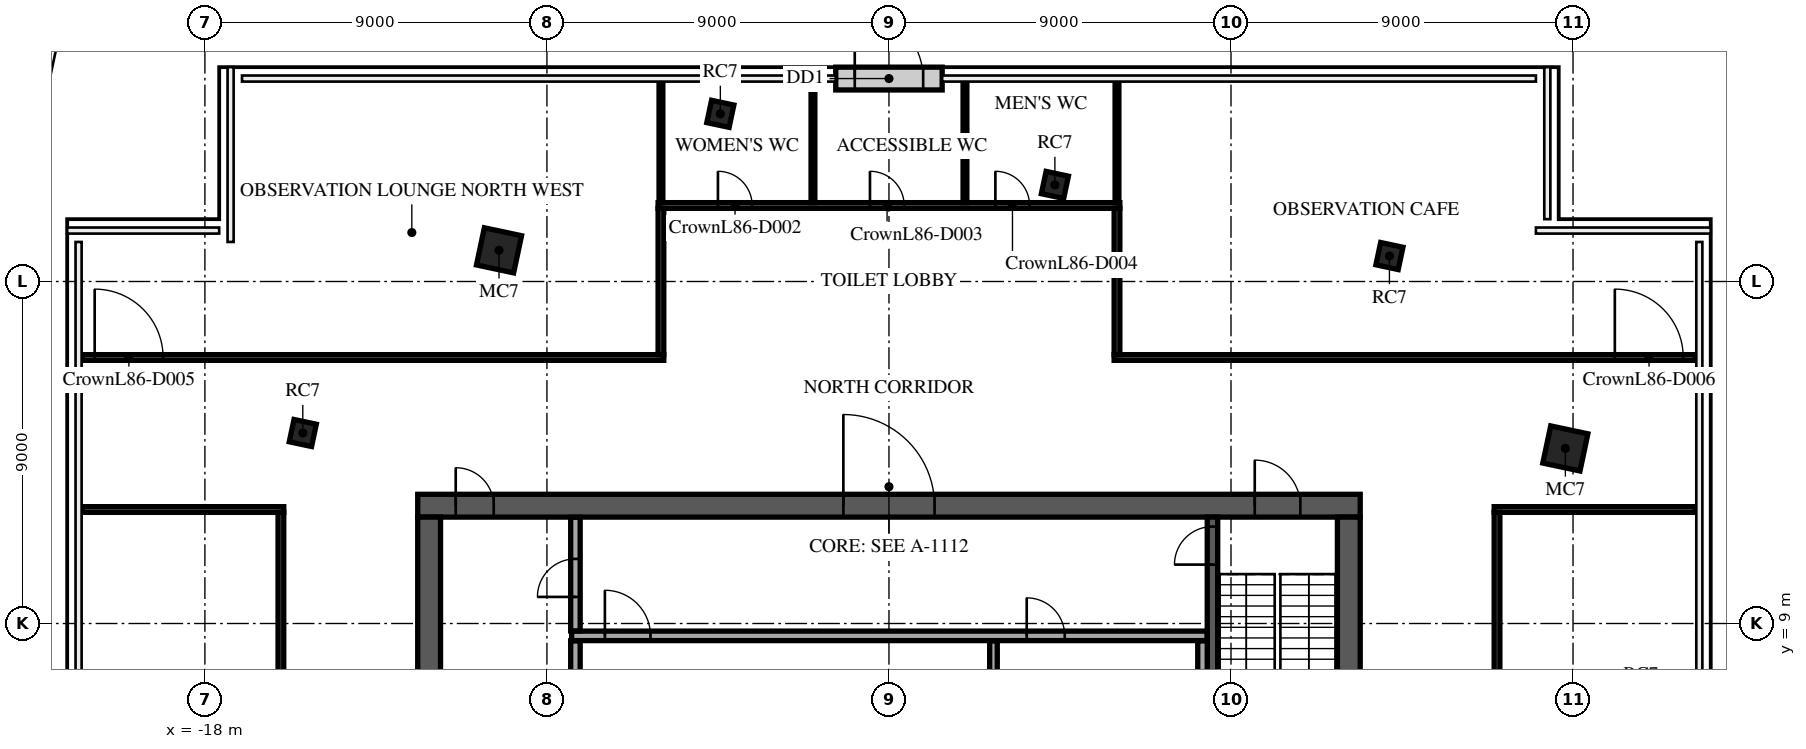
"""IFC4 building model, lengths in metres.
Left out: names, types, materials, properties, quantities, classifications, styles, units other than length and angle.
Written with IfcOpenShell. Run it as: python <this file> out.ifc"""

import sys

from ifc_helpers import new_model, si_unit, direction, frame, frame_2d, origin, origin_2d, place, context, subcontext, project, spatial, rectangle, extrude, element, fill, save


model = new_model("IFC4")
c1 = context("Model", 3, precision=1e-05, world=origin(), true_north=direction((0.0, 1.0)))
c2 = subcontext(c1, "Body", "Model", "MODEL_VIEW")
j1 = project(units=[si_unit("LENGTHUNIT", "METRE"), si_unit("PLANEANGLEUNIT", "RADIAN")], contexts=[c1])
p1 = place(None, origin())
s1 = spatial("IfcSite", under=j1, at=p1, CompositionType="ELEMENT")
p2 = place(p1, origin())
s2 = spatial("IfcBuilding", under=s1, at=p2, CompositionType="ELEMENT")
p3 = place(p2, frame((0.0, 0.0, 368.1)))
s3 = spatial("IfcBuildingStorey", under=s2, at=p3, CompositionType="ELEMENT", Elevation=368.1)
p4 = place(p3, frame((-10.261, 18.82, 0.0), z_axis=(0.0, 0.0, 1.0), x_axis=(0.207911690818, 0.978147600734, 0.0)))
e1 = element("IfcColumn", 1, at=p4, inside=s3, PredefinedType="COLUMN", context=c2, shape_type="SweptSolid", body=[
    extrude(rectangle(XDim=1.0, YDim=1.0, at=origin_2d()), origin(), (0.0, 0.0, 1.0), 5.0),
])
p5 = place(p3, frame((-15.424, 14.013, 0.0), z_axis=(0.0, 0.0, 1.0), x_axis=(0.207911690818, 0.978147600734, 0.0)))
e2 = element("IfcColumn", 2, at=p5, inside=s3, PredefinedType="COLUMN", context=c2, shape_type="SweptSolid", body=[
    extrude(rectangle(XDim=0.6, YDim=0.6, at=origin_2d()), origin(), (0.0, 0.0, 1.0), 5.0),
])
p6 = place(p3, frame((17.798, 13.607, 0.0), z_axis=(0.0, 0.0, 1.0), x_axis=(0.207911690818, 0.978147600734, 0.0)))
e3 = element("IfcColumn", 3, at=p6, inside=s3, PredefinedType="COLUMN", context=c2, shape_type="SweptSolid", body=[
    extrude(rectangle(XDim=1.0, YDim=1.0, at=origin_2d()), origin(), (0.0, 0.0, 1.0), 5.0),
])
for number, where, z_axis, x_axis in (
    (4, (13.169, 18.67, 0.0), (0.0, 0.0, 1.0), (0.208, 0.978, 0.0)),
    (5, (4.366, 20.541, 0.0), (0.0, 0.0, 1.0), (0.208, 0.978, 0.0)),
    (6, (-4.437, 22.412, 0.0), (0.0, 0.0, 1.0), (0.208, 0.978, 0.0)),
):
    element("IfcColumn", number, at=place(p3, frame(where, z_axis=z_axis, x_axis=x_axis)), inside=s3, PredefinedType="COLUMN", context=c2, shape_type="SweptSolid", body=[
        extrude(rectangle(XDim=0.6, YDim=0.6, at=origin_2d()), origin(), (0.0, 0.0, 1.0), 5.0),
    ])
p7 = place(p3, frame((-12.4, 12.1, 0.0), z_axis=(0.0, 0.0, 1.0), x_axis=(1.0, 0.0, 0.0)))
e7 = element("IfcWall", 7, at=p7, inside=s3, PredefinedType="SHEAR", context=c2, shape_type="SweptSolid", body=[
    extrude(rectangle(XDim=24.8, YDim=0.6, at=frame_2d((12.4, 0.0))), origin(), (0.0, 0.0, 1.0), 4.7),
])
p8 = place(p7, frame((11.2, 0.0, 0.0)))
e8 = element("IfcOpeningElement", 8, at=p8, cuts=e7, PredefinedType="OPENING", context=c2, shape_type="SweptSolid", body=[
    extrude(rectangle(XDim=2.4, YDim=2.4, at=frame_2d((1.2, 1.2))), frame((0.0, 0.31, 0.0), z_axis=(0.0, -1.0, 0.0), x_axis=(1.0, 0.0, 0.0)), (0.0, 0.0, 1.0), 0.62),
])
p9 = place(p7, frame((22.025, 0.0, 0.0)))
e9 = element("IfcOpeningElement", 9, at=p9, cuts=e7, PredefinedType="OPENING", context=c2, shape_type="SweptSolid", body=[
    extrude(rectangle(XDim=1.2, YDim=2.1, at=frame_2d((0.6, 1.05))), frame((0.0, 0.31, 0.0), z_axis=(0.0, -1.0, 0.0), x_axis=(1.0, 0.0, 0.0)), (0.0, 0.0, 1.0), 0.62),
])
p10 = place(p7, frame((1.0, 0.0, 0.0)))
e10 = element("IfcOpeningElement", 10, at=p10, cuts=e7, PredefinedType="OPENING", context=c2, shape_type="SweptSolid", body=[
    extrude(rectangle(XDim=1.0, YDim=2.1, at=frame_2d((0.5, 1.05))), frame((0.0, 0.31, 0.0), z_axis=(0.0, -1.0, 0.0), x_axis=(1.0, 0.0, 0.0)), (0.0, 0.0, 1.0), 0.62),
])
p11 = place(p3, frame((12.1, -11.8, 0.0), z_axis=(0.0, 0.0, 1.0), x_axis=(0.0, 1.0, 0.0)))
e11 = element("IfcWall", 11, at=p11, inside=s3, PredefinedType="SHEAR", context=c2, shape_type="SweptSolid", body=[
    extrude(rectangle(XDim=23.6, YDim=0.6, at=frame_2d((11.8, 0.0))), origin(), (0.0, 0.0, 1.0), 4.7),
])
p12 = place(p11, frame((10.6, 0.0, 0.0)))
e12 = element("IfcOpeningElement", 12, at=p12, cuts=e11, PredefinedType="OPENING", context=c2, shape_type="SweptSolid", body=[
    extrude(rectangle(XDim=2.4, YDim=2.4, at=frame_2d((1.2, 1.2))), frame((0.0, 0.31, 0.0), z_axis=(0.0, -1.0, 0.0), x_axis=(1.0, 0.0, 0.0)), (0.0, 0.0, 1.0), 0.62),
])
p13 = place(p3, frame((-12.1, -11.8, 0.0), z_axis=(0.0, 0.0, 1.0), x_axis=(0.0, 1.0, 0.0)))
e13 = element("IfcWall", 13, at=p13, inside=s3, PredefinedType="SHEAR", context=c2, shape_type="SweptSolid", body=[
    extrude(rectangle(XDim=23.6, YDim=0.6, at=frame_2d((11.8, 0.0))), origin(), (0.0, 0.0, 1.0), 4.7),
])
p14 = place(p13, frame((10.6, 0.0, 0.0)))
e14 = element("IfcOpeningElement", 14, at=p14, cuts=e13, PredefinedType="OPENING", context=c2, shape_type="SweptSolid", body=[
    extrude(rectangle(XDim=2.4, YDim=2.4, at=frame_2d((1.2, 1.2))), frame((0.0, 0.31, 0.0), z_axis=(0.0, -1.0, 0.0), x_axis=(1.0, 0.0, 0.0)), (0.0, 0.0, 1.0), 0.62),
])
p15 = place(p3, frame((8.512, 4.55, 0.0), z_axis=(0.0, 0.0, 1.0), x_axis=(0.0, 1.0, 0.0)))
e15 = element("IfcWall", 15, at=p15, inside=s3, PredefinedType="SOLIDWALL", context=c2, shape_type="SweptSolid", body=[
    extrude(rectangle(XDim=7.25, YDim=0.275, at=frame_2d((3.625, 0.0))), origin(), (0.0, 0.0, 1.0), 4.7),
])
p16 = place(p15, frame((6.0, 0.0, 0.0)))
e16 = element("IfcOpeningElement", 16, at=p16, cuts=e15, PredefinedType="OPENING", context=c2, shape_type="SweptSolid", body=[
    extrude(rectangle(XDim=1.0, YDim=2.1, at=frame_2d((0.5, 1.05))), frame((0.0, 0.147, 0.0), z_axis=(0.0, -1.0, 0.0), x_axis=(1.0, 0.0, 0.0)), (0.0, 0.0, 1.0), 0.295),
])
p17 = place(p3, frame((-8.25, 5.855, 0.0), z_axis=(0.0, 0.0, 1.0), x_axis=(0.0, 1.0, 0.0)))
e17 = element("IfcWall", 17, at=p17, inside=s3, PredefinedType="PARTITIONING", context=c2, shape_type="SweptSolid", body=[
    extrude(rectangle(XDim=2.69, YDim=0.25, at=frame_2d((1.345, 0.0))), origin(), (0.0, 0.0, 1.0), 4.7),
])
p18 = place(p3, frame((2.75, 5.855, 0.0), z_axis=(0.0, 0.0, 1.0), x_axis=(0.0, 1.0, 0.0)))
e18 = element("IfcWall", 18, at=p18, inside=s3, PredefinedType="PARTITIONING", context=c2, shape_type="SweptSolid", body=[
    extrude(rectangle(XDim=2.69, YDim=0.2, at=frame_2d((1.345, 0.0))), origin(), (0.0, 0.0, 1.0), 4.7),
])
p19 = place(p3, frame((8.25, 5.855, 0.0), z_axis=(0.0, 0.0, 1.0), x_axis=(0.0, 1.0, 0.0)))
e19 = element("IfcWall", 19, at=p19, inside=s3, PredefinedType="PARTITIONING", context=c2, shape_type="SweptSolid", body=[
    extrude(rectangle(XDim=2.69, YDim=0.25, at=frame_2d((1.345, 0.0))), origin(), (0.0, 0.0, 1.0), 4.7),
])
p20 = place(p3, frame((-8.35, 8.675, 0.0), z_axis=(0.0, 0.0, 1.0), x_axis=(1.0, 0.0, 0.0)))
e20 = element("IfcWall", 20, at=p20, inside=s3, PredefinedType="PARTITIONING", context=c2, shape_type="SweptSolid", body=[
    extrude(rectangle(XDim=16.72, YDim=0.25, at=frame_2d((8.36, 0.0))), origin(), (0.0, 0.0, 1.0), 4.7),
])
p21 = place(p20, frame((0.875, 0.0, 0.0)))
e21 = element("IfcOpeningElement", 21, at=p21, cuts=e20, PredefinedType="OPENING", context=c2, shape_type="SweptSolid", body=[
    extrude(rectangle(XDim=1.2, YDim=2.1, at=frame_2d((0.6, 1.05))), frame((0.0, 0.135, 0.0), z_axis=(0.0, -1.0, 0.0), x_axis=(1.0, 0.0, 0.0)), (0.0, 0.0, 1.0), 0.27),
])
p22 = place(p20, frame((11.975, 0.0, 0.0)))
e22 = element("IfcOpeningElement", 22, at=p22, cuts=e20, PredefinedType="OPENING", context=c2, shape_type="SweptSolid", body=[
    extrude(rectangle(XDim=1.0, YDim=2.1, at=frame_2d((0.5, 1.05))), frame((0.0, 0.135, 0.0), z_axis=(0.0, -1.0, 0.0), x_axis=(1.0, 0.0, 0.0)), (0.0, 0.0, 1.0), 0.27),
])
p23 = place(p3, frame((-8.25, 8.805, 0.0), z_axis=(0.0, 0.0, 1.0), x_axis=(0.0, 1.0, 0.0)))
e23 = element("IfcWall", 23, at=p23, inside=s3, PredefinedType="PARTITIONING", context=c2, shape_type="SweptSolid", body=[
    extrude(rectangle(XDim=2.99, YDim=0.25, at=frame_2d((1.495, 0.0))), origin(), (0.0, 0.0, 1.0), 4.7),
])
p24 = place(p23, frame((0.895, 0.0, 0.0)))
e24 = element("IfcOpeningElement", 24, at=p24, cuts=e23, PredefinedType="OPENING", context=c2, shape_type="SweptSolid", body=[
    extrude(rectangle(XDim=1.0, YDim=2.1, at=frame_2d((0.5, 1.05))), frame((0.0, 0.135, 0.0), z_axis=(0.0, -1.0, 0.0), x_axis=(1.0, 0.0, 0.0)), (0.0, 0.0, 1.0), 0.27),
])
for number, where, z_axis, x_axis in (
    (25, (-21.223, 12.0, 0.0), (0.0, 0.0, 1.0), (1.0, 0.0, 0.0)),
    (26, (15.925, 12.0, 0.0), (0.0, 0.0, 1.0), (1.0, 0.0, 0.0)),
):
    element("IfcWall", number, at=place(p3, frame(where, z_axis=z_axis, x_axis=x_axis)), inside=s3, PredefinedType="PARTITIONING", context=c2, shape_type="SweptSolid", body=[
        extrude(rectangle(XDim=5.298, YDim=0.15, at=frame_2d((2.649, 0.0))), origin(), (0.0, 0.0, 1.0), 4.7),
    ])
p25 = place(p3, frame((-21.223, 16.0, 0.0), z_axis=(0.0, 0.0, 1.0), x_axis=(1.0, 0.0, 0.0)))
e27 = element("IfcWall", 27, at=p25, inside=s3, PredefinedType="PARTITIONING", context=c2, shape_type="SweptSolid", body=[
    extrude(rectangle(XDim=15.298, YDim=0.15, at=frame_2d((7.649, 0.0))), origin(), (0.0, 0.0, 1.0), 4.7),
])
p26 = place(p25, frame((0.323, 0.0, 0.0)))
e28 = element("IfcOpeningElement", 28, at=p26, cuts=e27, PredefinedType="OPENING", context=c2, shape_type="SweptSolid", body=[
    extrude(rectangle(XDim=1.8, YDim=2.1, at=frame_2d((0.9, 1.05))), frame((0.0, 0.085, 0.0), z_axis=(0.0, -1.0, 0.0), x_axis=(1.0, 0.0, 0.0)), (0.0, 0.0, 1.0), 0.17),
])
p27 = place(p3, frame((5.925, 16.0, 0.0), z_axis=(0.0, 0.0, 1.0), x_axis=(1.0, 0.0, 0.0)))
e29 = element("IfcWall", 29, at=p27, inside=s3, PredefinedType="PARTITIONING", context=c2, shape_type="SweptSolid", body=[
    extrude(rectangle(XDim=15.298, YDim=0.15, at=frame_2d((7.649, 0.0))), origin(), (0.0, 0.0, 1.0), 4.7),
])
p28 = place(p27, frame((13.175, 0.0, 0.0)))
e30 = element("IfcOpeningElement", 30, at=p28, cuts=e29, PredefinedType="OPENING", context=c2, shape_type="SweptSolid", body=[
    extrude(rectangle(XDim=1.8, YDim=2.1, at=frame_2d((0.9, 1.05))), frame((0.0, 0.085, 0.0), z_axis=(0.0, -1.0, 0.0), x_axis=(1.0, 0.0, 0.0)), (0.0, 0.0, 1.0), 0.17),
])
p29 = place(p3, frame((-6.075, 20.0, 0.0), z_axis=(0.0, 0.0, 1.0), x_axis=(1.0, 0.0, 0.0)))
e31 = element("IfcWall", 31, at=p29, inside=s3, PredefinedType="PARTITIONING", context=c2, shape_type="SweptSolid", body=[
    extrude(rectangle(XDim=12.15, YDim=0.15, at=frame_2d((6.075, 0.0))), origin(), (0.0, 0.0, 1.0), 4.7),
])
p30 = place(p29, frame((1.575, 0.0, 0.0)))
e32 = element("IfcOpeningElement", 32, at=p30, cuts=e31, PredefinedType="OPENING", context=c2, shape_type="SweptSolid", body=[
    extrude(rectangle(XDim=0.9, YDim=2.1, at=frame_2d((0.45, 1.05))), frame((0.0, 0.085, 0.0), z_axis=(0.0, -1.0, 0.0), x_axis=(1.0, 0.0, 0.0)), (0.0, 0.0, 1.0), 0.17),
])
p31 = place(p29, frame((5.575, 0.0, 0.0)))
e33 = element("IfcOpeningElement", 33, at=p31, cuts=e31, PredefinedType="OPENING", context=c2, shape_type="SweptSolid", body=[
    extrude(rectangle(XDim=0.9, YDim=2.1, at=frame_2d((0.45, 1.05))), frame((0.0, 0.085, 0.0), z_axis=(0.0, -1.0, 0.0), x_axis=(1.0, 0.0, 0.0)), (0.0, 0.0, 1.0), 0.17),
])
p32 = place(p29, frame((8.875, 0.0, 0.0)))
e34 = element("IfcOpeningElement", 34, at=p32, cuts=e31, PredefinedType="OPENING", context=c2, shape_type="SweptSolid", body=[
    extrude(rectangle(XDim=0.9, YDim=2.1, at=frame_2d((0.45, 1.05))), frame((0.0, 0.085, 0.0), z_axis=(0.0, -1.0, 0.0), x_axis=(1.0, 0.0, 0.0)), (0.0, 0.0, 1.0), 0.17),
])
p33 = place(p3, frame((-16.0, -11.925, 0.0), z_axis=(0.0, 0.0, 1.0), x_axis=(0.0, 1.0, 0.0)))
e35 = element("IfcWall", 35, at=p33, inside=s3, PredefinedType="PARTITIONING", context=c2, shape_type="SweptSolid", body=[
    extrude(rectangle(XDim=23.85, YDim=0.15, at=frame_2d((11.925, 0.0))), origin(), (0.0, 0.0, 1.0), 4.32),
])
p34 = place(p33, frame((11.025, 0.0, 0.0)))
e36 = element("IfcOpeningElement", 36, at=p34, cuts=e35, PredefinedType="OPENING", context=c2, shape_type="SweptSolid", body=[
    extrude(rectangle(XDim=1.8, YDim=2.1, at=frame_2d((0.9, 1.05))), frame((0.0, 0.085, 0.0), z_axis=(0.0, -1.0, 0.0), x_axis=(1.0, 0.0, 0.0)), (0.0, 0.0, 1.0), 0.17),
])
p35 = place(p3, frame((-6.0, 16.075, 0.0), z_axis=(0.0, 0.0, 1.0), x_axis=(0.0, 1.0, 0.0)))
e37 = element("IfcWall", 37, at=p35, inside=s3, PredefinedType="PARTITIONING", context=c2, shape_type="SweptSolid", body=[
    extrude(rectangle(XDim=3.85, YDim=0.15, at=frame_2d((1.925, 0.0))), origin(), (0.0, 0.0, 1.0), 4.7),
])
for number, where, z_axis, x_axis in (
    (38, (-6.0, 20.075, 0.0), (0.0, 0.0, 1.0), (0.0, 1.0, 0.0)),
    (39, (-2.0, 20.075, 0.0), (0.0, 0.0, 1.0), (0.0, 1.0, 0.0)),
    (40, (2.0, 20.075, 0.0), (0.0, 0.0, 1.0), (0.0, 1.0, 0.0)),
):
    element("IfcWall", number, at=place(p3, frame(where, z_axis=z_axis, x_axis=x_axis)), inside=s3, PredefinedType="PARTITIONING", context=c2, shape_type="SweptSolid", body=[
        extrude(rectangle(XDim=3.165, YDim=0.1, at=frame_2d((1.583, 0.0))), origin(), (0.0, 0.0, 1.0), 4.7),
    ])
p36 = place(p3, frame((6.0, 16.075, 0.0), z_axis=(0.0, 0.0, 1.0), x_axis=(0.0, 1.0, 0.0)))
e41 = element("IfcWall", 41, at=p36, inside=s3, PredefinedType="PARTITIONING", context=c2, shape_type="SweptSolid", body=[
    extrude(rectangle(XDim=3.85, YDim=0.15, at=frame_2d((1.925, 0.0))), origin(), (0.0, 0.0, 1.0), 4.7),
])
p37 = place(p3, frame((6.0, 20.075, 0.0), z_axis=(0.0, 0.0, 1.0), x_axis=(0.0, 1.0, 0.0)))
e42 = element("IfcWall", 42, at=p37, inside=s3, PredefinedType="PARTITIONING", context=c2, shape_type="SweptSolid", body=[
    extrude(rectangle(XDim=3.165, YDim=0.1, at=frame_2d((1.583, 0.0))), origin(), (0.0, 0.0, 1.0), 4.7),
])
p38 = place(p3, frame((16.0, -11.925, 0.0), z_axis=(0.0, 0.0, 1.0), x_axis=(0.0, 1.0, 0.0)))
e43 = element("IfcWall", 43, at=p38, inside=s3, PredefinedType="PARTITIONING", context=c2, shape_type="SweptSolid", body=[
    extrude(rectangle(XDim=23.85, YDim=0.15, at=frame_2d((11.925, 0.0))), origin(), (0.0, 0.0, 1.0), 4.32),
])
p39 = place(p38, frame((11.025, 0.0, 0.0)))
e44 = element("IfcOpeningElement", 44, at=p39, cuts=e43, PredefinedType="OPENING", context=c2, shape_type="SweptSolid", body=[
    extrude(rectangle(XDim=1.8, YDim=2.1, at=frame_2d((0.9, 1.05))), frame((0.0, 0.085, 0.0), z_axis=(0.0, -1.0, 0.0), x_axis=(1.0, 0.0, 0.0)), (0.0, 0.0, 1.0), 0.17),
])
p40 = place(p3, frame((-1.4, 23.34, 0.0), z_axis=(0.0, 0.0, 1.0), x_axis=(1.0, 0.0, 0.0)))
e45 = element("IfcWall", 45, at=p40, inside=s3, PredefinedType="STANDARD", context=c2, shape_type="SweptSolid", body=[
    extrude(rectangle(XDim=2.8, YDim=0.6, at=frame_2d((1.4, 0.0))), origin(), (0.0, 0.0, 1.0), 4.7),
])
p41 = place(p40, frame((0.5, 0.0, 0.0)))
e46 = element("IfcOpeningElement", 46, at=p41, cuts=e45, PredefinedType="OPENING", context=c2, shape_type="SweptSolid", body=[
    extrude(rectangle(XDim=1.8, YDim=2.4, at=frame_2d((0.9, 1.2))), frame((0.0, 0.31, 0.0), z_axis=(0.0, -1.0, 0.0), x_axis=(1.0, 0.0, 0.0)), (0.0, 0.0, 1.0), 0.62),
])
p42 = place(p8, origin())
e47 = element("IfcDoor", 47, at=p42, inside=s3, OperationType="SINGLE_SWING_LEFT", PredefinedType="DOOR", context=c2, shape_type="SweptSolid", body=[
    extrude(rectangle(XDim=2.4, YDim=2.4, at=frame_2d((1.2, 1.2))), frame((0.0, 0.025, 0.0), z_axis=(0.0, -1.0, 0.0), x_axis=(1.0, 0.0, 0.0)), (0.0, 0.0, 1.0), 0.05),
])
fill(e8, e47)
p43 = place(p9, origin())
e48 = element("IfcDoor", 48, at=p43, inside=s3, OperationType="SINGLE_SWING_LEFT", PredefinedType="DOOR", context=c2, shape_type="SweptSolid", body=[
    extrude(rectangle(XDim=1.2, YDim=2.1, at=frame_2d((0.6, 1.05))), frame((0.0, 0.025, 0.0), z_axis=(0.0, -1.0, 0.0), x_axis=(1.0, 0.0, 0.0)), (0.0, 0.0, 1.0), 0.05),
])
fill(e9, e48)
p44 = place(p10, origin())
e49 = element("IfcDoor", 49, at=p44, inside=s3, OperationType="SINGLE_SWING_LEFT", PredefinedType="DOOR", context=c2, shape_type="SweptSolid", body=[
    extrude(rectangle(XDim=1.0, YDim=2.1, at=frame_2d((0.5, 1.05))), frame((0.0, 0.025, 0.0), z_axis=(0.0, -1.0, 0.0), x_axis=(1.0, 0.0, 0.0)), (0.0, 0.0, 1.0), 0.05),
])
fill(e10, e49)
p45 = place(p16, origin())
e50 = element("IfcDoor", 50, at=p45, inside=s3, OperationType="SINGLE_SWING_LEFT", PredefinedType="DOOR", context=c2, shape_type="SweptSolid", body=[
    extrude(rectangle(XDim=1.0, YDim=2.1, at=frame_2d((0.5, 1.05))), frame((0.0, 0.025, 0.0), z_axis=(0.0, -1.0, 0.0), x_axis=(1.0, 0.0, 0.0)), (0.0, 0.0, 1.0), 0.05),
])
fill(e16, e50)
p46 = place(p24, origin())
e51 = element("IfcDoor", 51, at=p46, inside=s3, OperationType="SINGLE_SWING_LEFT", PredefinedType="DOOR", context=c2, shape_type="SweptSolid", body=[
    extrude(rectangle(XDim=1.0, YDim=2.1, at=frame_2d((0.5, 1.05))), frame((0.0, 0.025, 0.0), z_axis=(0.0, -1.0, 0.0), x_axis=(1.0, 0.0, 0.0)), (0.0, 0.0, 1.0), 0.05),
])
fill(e24, e51)
p47 = place(p21, origin())
e52 = element("IfcDoor", 52, at=p47, inside=s3, OperationType="SINGLE_SWING_LEFT", PredefinedType="DOOR", context=c2, shape_type="SweptSolid", body=[
    extrude(rectangle(XDim=1.2, YDim=2.1, at=frame_2d((0.6, 1.05))), frame((0.0, 0.025, 0.0), z_axis=(0.0, -1.0, 0.0), x_axis=(1.0, 0.0, 0.0)), (0.0, 0.0, 1.0), 0.05),
])
fill(e21, e52)
p48 = place(p22, origin())
e53 = element("IfcDoor", 53, at=p48, inside=s3, OperationType="SINGLE_SWING_LEFT", PredefinedType="DOOR", context=c2, shape_type="SweptSolid", body=[
    extrude(rectangle(XDim=1.0, YDim=2.1, at=frame_2d((0.5, 1.05))), frame((0.0, 0.025, 0.0), z_axis=(0.0, -1.0, 0.0), x_axis=(1.0, 0.0, 0.0)), (0.0, 0.0, 1.0), 0.05),
])
fill(e22, e53)
p49 = place(p30, origin())
e54 = element("IfcDoor", 54, at=p49, inside=s3, OperationType="SINGLE_SWING_RIGHT", PredefinedType="DOOR", context=c2, shape_type="SweptSolid", body=[
    extrude(rectangle(XDim=0.9, YDim=2.1, at=frame_2d((0.45, 1.05))), frame((0.0, 0.025, 0.0), z_axis=(0.0, -1.0, 0.0), x_axis=(1.0, 0.0, 0.0)), (0.0, 0.0, 1.0), 0.05),
])
fill(e32, e54)
p50 = place(p31, origin())
e55 = element("IfcDoor", 55, at=p50, inside=s3, OperationType="SINGLE_SWING_LEFT", PredefinedType="DOOR", context=c2, shape_type="SweptSolid", body=[
    extrude(rectangle(XDim=0.9, YDim=2.1, at=frame_2d((0.45, 1.05))), frame((0.0, 0.025, 0.0), z_axis=(0.0, -1.0, 0.0), x_axis=(1.0, 0.0, 0.0)), (0.0, 0.0, 1.0), 0.05),
])
fill(e33, e55)
p51 = place(p32, origin())
e56 = element("IfcDoor", 56, at=p51, inside=s3, OperationType="SINGLE_SWING_RIGHT", PredefinedType="DOOR", context=c2, shape_type="SweptSolid", body=[
    extrude(rectangle(XDim=0.9, YDim=2.1, at=frame_2d((0.45, 1.05))), frame((0.0, 0.025, 0.0), z_axis=(0.0, -1.0, 0.0), x_axis=(1.0, 0.0, 0.0)), (0.0, 0.0, 1.0), 0.05),
])
fill(e34, e56)
p52 = place(p26, origin())
e57 = element("IfcDoor", 57, at=p52, inside=s3, OperationType="DOUBLE_DOOR_SINGLE_SWING", PredefinedType="DOOR", context=c2, shape_type="SweptSolid", body=[
    extrude(rectangle(XDim=1.8, YDim=2.1, at=frame_2d((0.9, 1.05))), frame((0.0, 0.025, 0.0), z_axis=(0.0, -1.0, 0.0), x_axis=(1.0, 0.0, 0.0)), (0.0, 0.0, 1.0), 0.05),
])
fill(e28, e57)
p53 = place(p28, origin())
e58 = element("IfcDoor", 58, at=p53, inside=s3, OperationType="DOUBLE_DOOR_SINGLE_SWING", PredefinedType="DOOR", context=c2, shape_type="SweptSolid", body=[
    extrude(rectangle(XDim=1.8, YDim=2.1, at=frame_2d((0.9, 1.05))), frame((0.0, 0.025, 0.0), z_axis=(0.0, -1.0, 0.0), x_axis=(1.0, 0.0, 0.0)), (0.0, 0.0, 1.0), 0.05),
])
fill(e30, e58)
p54 = place(p41, origin())
e59 = element("IfcDoor", 59, at=p54, inside=s3, OperationType="DOUBLE_DOOR_SINGLE_SWING", PredefinedType="DOOR", context=c2, shape_type="SweptSolid", body=[
    extrude(rectangle(XDim=1.8, YDim=2.4, at=frame_2d((0.9, 1.2))), frame((0.0, 0.025, 0.0), z_axis=(0.0, -1.0, 0.0), x_axis=(1.0, 0.0, 0.0)), (0.0, 0.0, 1.0), 0.05),
])
fill(e46, e59)
save(model, sys.argv[1])
